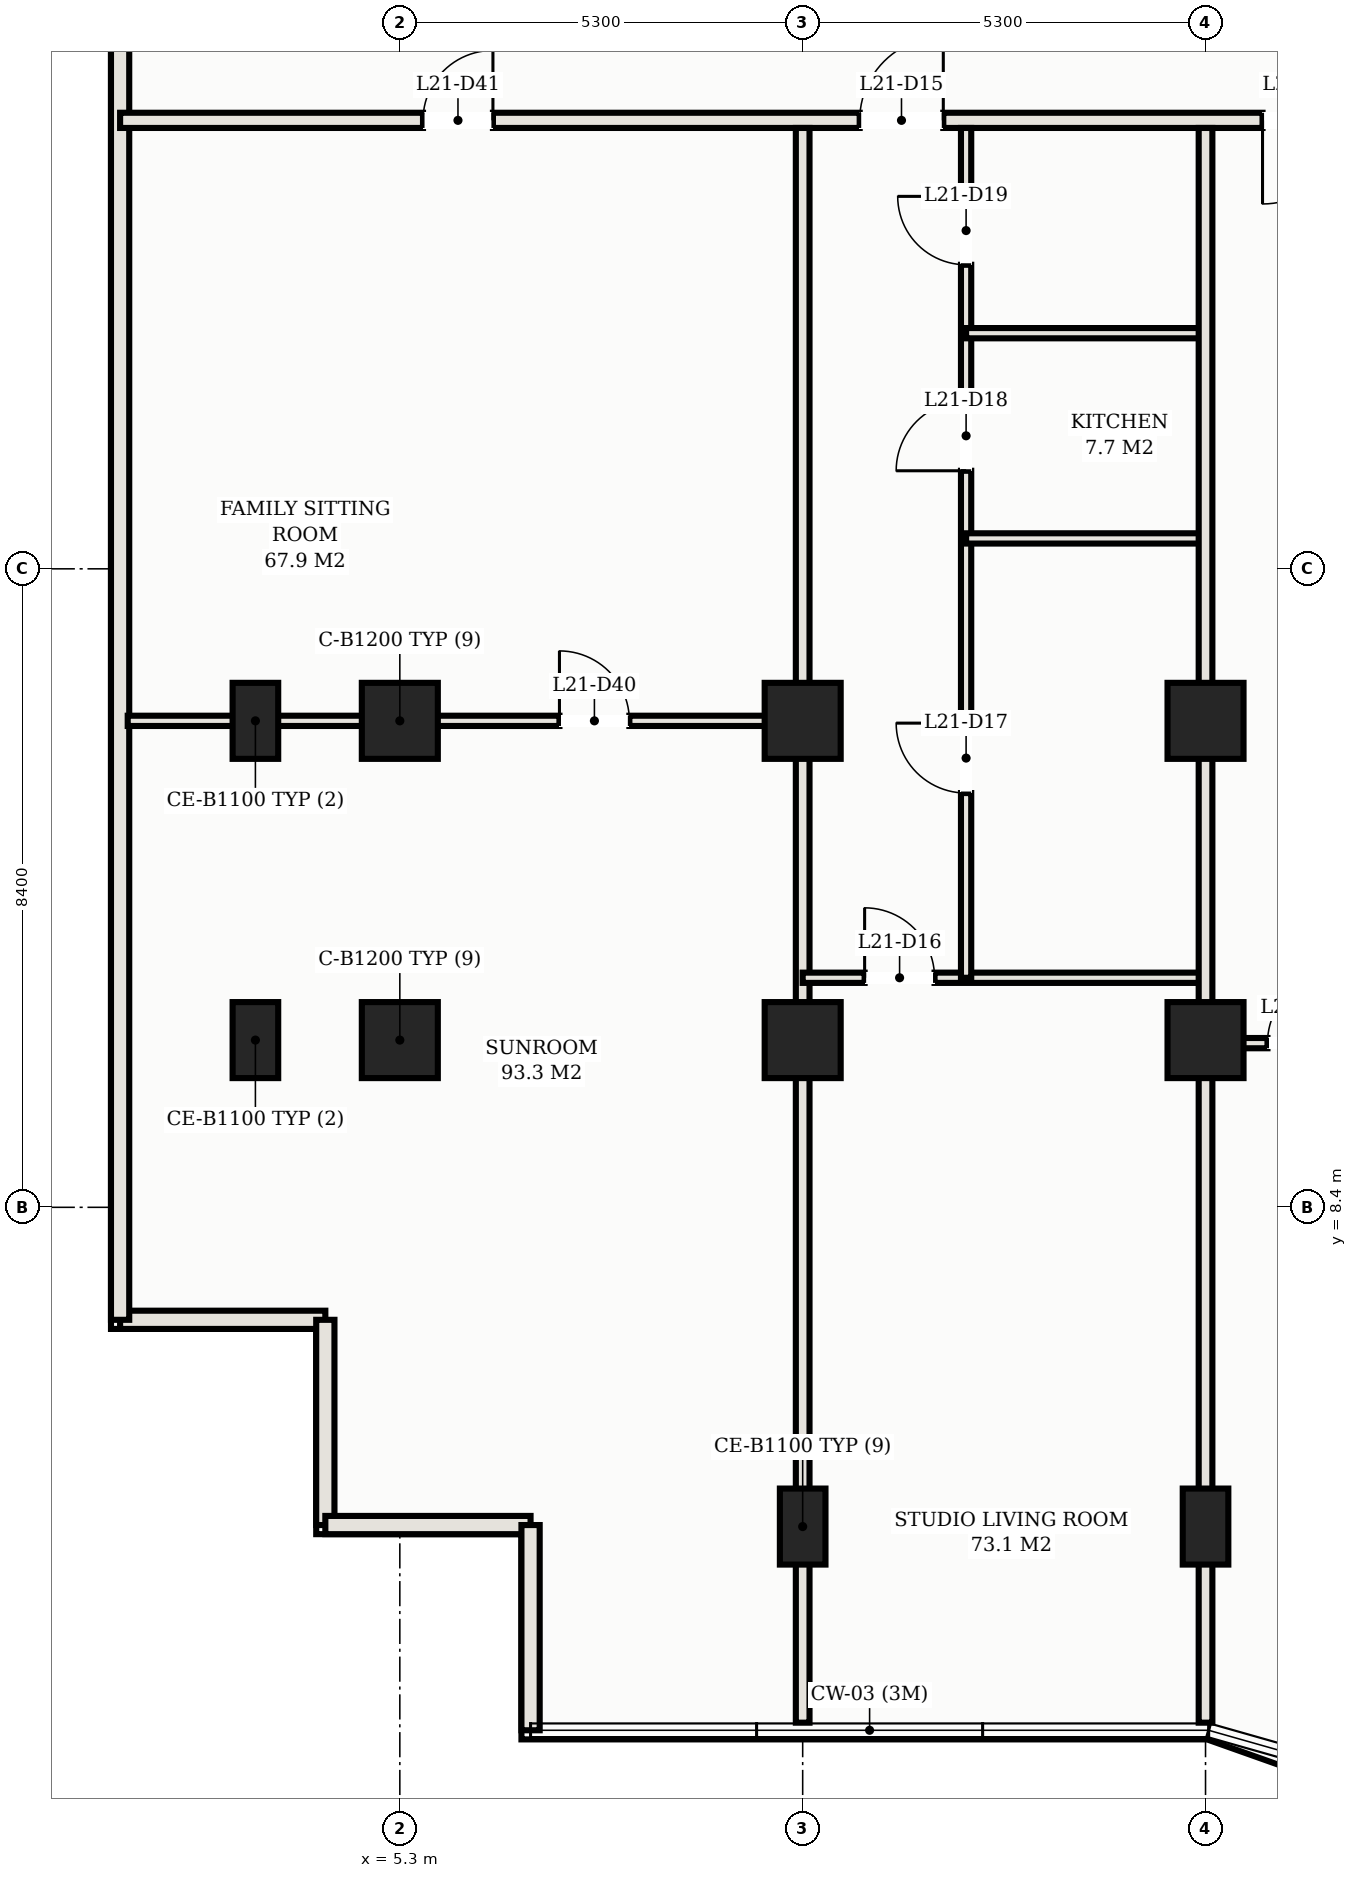
"""IFC4 building model, lengths in metres.
Left out: names, types, materials, properties, quantities, classifications, styles, units other than length and angle.
Written with IfcOpenShell. Run it as: python <this file> out.ifc"""

import sys

from ifc_helpers import new_model, si_unit, direction, frame, frame_2d, origin, origin_2d, place, context, subcontext, project, spatial, rectangle, hollow_rectangle, extrude, element, fill, save


model = new_model("IFC4")
c1 = context("Model", 3, precision=1e-05, world=origin(), true_north=direction((0.0, 1.0)))
c2 = subcontext(c1, "Body", "Model", "MODEL_VIEW")
j1 = project(units=[si_unit("LENGTHUNIT", "METRE"), si_unit("PLANEANGLEUNIT", "RADIAN")], contexts=[c1])
p1 = place(None, origin())
s1 = spatial("IfcSite", under=j1, at=p1, CompositionType="ELEMENT")
p2 = place(p1, origin())
s2 = spatial("IfcBuilding", under=s1, at=p2, CompositionType="ELEMENT")
p3 = place(p2, frame((0.0, 0.0, 81.7)))
s3 = spatial("IfcBuildingStorey", under=s2, at=p3, CompositionType="ELEMENT", Elevation=81.7)
for number, where, z_axis, x_axis in (
    (1, (10.6, 14.8, 0.0), (0.0, 0.0, 1.0), (1.0, 0.0, 0.0)),
    (2, (10.6, 10.6, 0.0), (0.0, 0.0, 1.0), (1.0, 0.0, 0.0)),
    (3, (15.9, 14.8, 0.0), (0.0, 0.0, 1.0), (1.0, 0.0, 0.0)),
    (4, (15.9, 10.6, 0.0), (0.0, 0.0, 1.0), (1.0, 0.0, 0.0)),
):
    element("IfcColumn", number, at=place(p3, frame(where, z_axis=z_axis, x_axis=x_axis)), inside=s3, PredefinedType="COLUMN", context=c2, shape_type="SweptSolid", body=[
        extrude(hollow_rectangle(XDim=1.0, YDim=1.0, WallThickness=0.036, at=origin_2d()), origin(), (0.0, 0.0, 1.0), 3.3),
    ])
for number, where, z_axis, x_axis in (
    (5, (10.6, 4.2, 0.0), (0.0, 0.0, 1.0), (1.0, 0.0, 0.0)),
    (6, (15.9, 4.2, 0.0), (0.0, 0.0, 1.0), (1.0, 0.0, 0.0)),
    (7, (3.4, 10.6, 0.0), (0.0, 0.0, 1.0), (1.0, 0.0, 0.0)),
    (8, (3.4, 14.8, 0.0), (0.0, 0.0, 1.0), (1.0, 0.0, 0.0)),
):
    element("IfcColumn", number, at=place(p3, frame(where, z_axis=z_axis, x_axis=x_axis)), inside=s3, PredefinedType="COLUMN", context=c2, shape_type="SweptSolid", body=[
        extrude(hollow_rectangle(XDim=0.6, YDim=1.0, WallThickness=0.032, at=origin_2d()), origin(), (0.0, 0.0, 1.0), 3.3),
    ])
for number, where, z_axis, x_axis in (
    (9, (5.3, 10.6, 0.0), (0.0, 0.0, 1.0), (1.0, 0.0, 0.0)),
    (10, (5.3, 14.8, 0.0), (0.0, 0.0, 1.0), (1.0, 0.0, 0.0)),
):
    element("IfcColumn", number, at=place(p3, frame(where, z_axis=z_axis, x_axis=x_axis)), inside=s3, PredefinedType="COLUMN", context=c2, shape_type="SweptSolid", body=[
        extrude(hollow_rectangle(XDim=1.0, YDim=1.0, WallThickness=0.036, at=origin_2d()), origin(), (0.0, 0.0, 1.0), 3.3),
    ])
for number, where, z_axis, x_axis in (
    (11, (1.62, 6.92, 0.0), (0.0, 0.0, 1.0), (1.0, 0.0, 0.0)),
    (12, (4.32, 6.92, 0.0), (0.0, 0.0, 1.0), (0.0, -1.0, 0.0)),
    (13, (4.32, 4.22, 0.0), (0.0, 0.0, 1.0), (1.0, 0.0, 0.0)),
    (14, (7.02, 4.22, 0.0), (0.0, 0.0, 1.0), (0.0, -1.0, 0.0)),
):
    element("IfcWall", number, at=place(p3, frame(where, z_axis=z_axis, x_axis=x_axis)), inside=s3, PredefinedType="SOLIDWALL", context=c2, shape_type="SweptSolid", body=[
        extrude(rectangle(XDim=2.7, YDim=0.24, at=frame_2d((1.35, 0.0))), origin(), (0.0, 0.0, 1.0), 3.09),
    ])
p4 = place(p3, frame((1.62, 35.33, 0.0), z_axis=(0.0, 0.0, 1.0), x_axis=(0.0, -1.0, 0.0)))
e15 = element("IfcWall", 15, at=p4, inside=s3, PredefinedType="SOLIDWALL", context=c2, shape_type="SweptSolid", body=[
    extrude(rectangle(XDim=28.41, YDim=0.24, at=frame_2d((14.205, 0.0))), origin(), (0.0, 0.0, 1.0), 3.09),
])
p5 = place(p3, frame((1.62, 22.7, 0.0), z_axis=(0.0, 0.0, 1.0), x_axis=(1.0, 0.0, 0.0)))
e16 = element("IfcWall", 16, at=p5, inside=s3, PredefinedType="PARTITIONING", context=c2, shape_type="SweptSolid", body=[
    extrude(rectangle(XDim=49.76, YDim=0.2, at=frame_2d((24.88, 0.0))), origin(), (0.0, 0.0, 1.0), 2.38),
])
p6 = place(p5, frame((9.73, 0.0, 0.0)))
e17 = element("IfcOpeningElement", 17, at=p6, cuts=e16, PredefinedType="OPENING", context=c2, shape_type="SweptSolid", body=[
    extrude(rectangle(XDim=1.1, YDim=2.25, at=frame_2d((0.55, 1.125))), frame((0.0, 0.11, 0.0), z_axis=(0.0, -1.0, 0.0), x_axis=(1.0, 0.0, 0.0)), (0.0, 0.0, 1.0), 0.22),
])
p7 = place(p5, frame((15.03, 0.0, 0.0)))
e18 = element("IfcOpeningElement", 18, at=p7, cuts=e16, PredefinedType="OPENING", context=c2, shape_type="SweptSolid", body=[
    extrude(rectangle(XDim=1.1, YDim=2.25, at=frame_2d((0.55, 1.125))), frame((0.0, 0.11, 0.0), z_axis=(0.0, -1.0, 0.0), x_axis=(1.0, 0.0, 0.0)), (0.0, 0.0, 1.0), 0.22),
])
p8 = place(p5, frame((20.33, 0.0, 0.0)))
e19 = element("IfcOpeningElement", 19, at=p8, cuts=e16, PredefinedType="OPENING", context=c2, shape_type="SweptSolid", body=[
    extrude(rectangle(XDim=1.1, YDim=2.25, at=frame_2d((0.55, 1.125))), frame((0.0, 0.11, 0.0), z_axis=(0.0, -1.0, 0.0), x_axis=(1.0, 0.0, 0.0)), (0.0, 0.0, 1.0), 0.22),
])
p9 = place(p5, frame((25.63, 0.0, 0.0)))
e20 = element("IfcOpeningElement", 20, at=p9, cuts=e16, PredefinedType="OPENING", context=c2, shape_type="SweptSolid", body=[
    extrude(rectangle(XDim=1.1, YDim=2.25, at=frame_2d((0.55, 1.125))), frame((0.0, 0.11, 0.0), z_axis=(0.0, -1.0, 0.0), x_axis=(1.0, 0.0, 0.0)), (0.0, 0.0, 1.0), 0.22),
])
p10 = place(p5, frame((33.33, 0.0, 0.0)))
e21 = element("IfcOpeningElement", 21, at=p10, cuts=e16, PredefinedType="OPENING", context=c2, shape_type="SweptSolid", body=[
    extrude(rectangle(XDim=1.1, YDim=2.25, at=frame_2d((0.55, 1.125))), frame((0.0, 0.11, 0.0), z_axis=(0.0, -1.0, 0.0), x_axis=(1.0, 0.0, 0.0)), (0.0, 0.0, 1.0), 0.22),
])
p11 = place(p5, frame((3.985, 0.0, 0.0)))
e22 = element("IfcOpeningElement", 22, at=p11, cuts=e16, PredefinedType="OPENING", context=c2, shape_type="SweptSolid", body=[
    extrude(rectangle(XDim=0.92, YDim=2.15, at=frame_2d((0.46, 1.075))), frame((0.0, 0.11, 0.0), z_axis=(0.0, -1.0, 0.0), x_axis=(1.0, 0.0, 0.0)), (0.0, 0.0, 1.0), 0.22),
])
p12 = place(p5, frame((44.855, 0.0, 0.0)))
e23 = element("IfcOpeningElement", 23, at=p12, cuts=e16, PredefinedType="OPENING", context=c2, shape_type="SweptSolid", body=[
    extrude(rectangle(XDim=0.92, YDim=2.15, at=frame_2d((0.46, 1.075))), frame((0.0, 0.11, 0.0), z_axis=(0.0, -1.0, 0.0), x_axis=(1.0, 0.0, 0.0)), (0.0, 0.0, 1.0), 0.22),
])
p13 = place(p3, frame((10.6, 1.62, 0.0), z_axis=(0.0, 0.0, 1.0), x_axis=(0.0, 1.0, 0.0)))
e24 = element("IfcWall", 24, at=p13, inside=s3, PredefinedType="PARTITIONING", context=c2, shape_type="SweptSolid", body=[
    extrude(rectangle(XDim=20.98, YDim=0.18, at=frame_2d((10.49, 0.0))), origin(), (0.0, 0.0, 1.0), 2.335),
])
p14 = place(p3, frame((10.6, 11.42, 0.0), z_axis=(0.0, 0.0, 1.0), x_axis=(1.0, 0.0, 0.0)))
e25 = element("IfcWall", 25, at=p14, inside=s3, PredefinedType="PARTITIONING", context=c2, shape_type="SweptSolid", body=[
    extrude(rectangle(XDim=5.3, YDim=0.135, at=frame_2d((2.65, 0.0))), origin(), (0.0, 0.0, 1.0), 2.38),
])
p15 = place(p14, frame((0.815, 0.0, 0.0)))
e26 = element("IfcOpeningElement", 26, at=p15, cuts=e25, PredefinedType="OPENING", context=c2, shape_type="SweptSolid", body=[
    extrude(rectangle(XDim=0.92, YDim=2.15, at=frame_2d((0.46, 1.075))), frame((0.0, 0.078, 0.0), z_axis=(0.0, -1.0, 0.0), x_axis=(1.0, 0.0, 0.0)), (0.0, 0.0, 1.0), 0.155),
])
p16 = place(p3, frame((12.75, 11.42, 0.0), z_axis=(0.0, 0.0, 1.0), x_axis=(0.0, 1.0, 0.0)))
e27 = element("IfcWall", 27, at=p16, inside=s3, PredefinedType="PARTITIONING", context=c2, shape_type="SweptSolid", body=[
    extrude(rectangle(XDim=11.18, YDim=0.135, at=frame_2d((5.59, 0.0))), origin(), (0.0, 0.0, 1.0), 2.38),
])
p17 = place(p16, frame((2.43, 0.0, 0.0)))
e28 = element("IfcOpeningElement", 28, at=p17, cuts=e27, PredefinedType="OPENING", context=c2, shape_type="SweptSolid", body=[
    extrude(rectangle(XDim=0.92, YDim=2.15, at=frame_2d((0.46, 1.075))), frame((0.0, 0.078, 0.0), z_axis=(0.0, -1.0, 0.0), x_axis=(1.0, 0.0, 0.0)), (0.0, 0.0, 1.0), 0.155),
])
p18 = place(p16, frame((6.67, 0.0, 0.0)))
e29 = element("IfcOpeningElement", 29, at=p18, cuts=e27, PredefinedType="OPENING", context=c2, shape_type="SweptSolid", body=[
    extrude(rectangle(XDim=0.92, YDim=2.15, at=frame_2d((0.46, 1.075))), frame((0.0, 0.078, 0.0), z_axis=(0.0, -1.0, 0.0), x_axis=(1.0, 0.0, 0.0)), (0.0, 0.0, 1.0), 0.155),
])
p19 = place(p16, frame((9.38, 0.0, 0.0)))
e30 = element("IfcOpeningElement", 30, at=p19, cuts=e27, PredefinedType="OPENING", context=c2, shape_type="SweptSolid", body=[
    extrude(rectangle(XDim=0.9, YDim=2.15, at=frame_2d((0.45, 1.075))), frame((0.0, 0.078, 0.0), z_axis=(0.0, -1.0, 0.0), x_axis=(1.0, 0.0, 0.0)), (0.0, 0.0, 1.0), 0.155),
])
for number, where, z_axis, x_axis in (
    (31, (12.75, 17.2, 0.0), (0.0, 0.0, 1.0), (1.0, 0.0, 0.0)),
    (32, (12.75, 19.9, 0.0), (0.0, 0.0, 1.0), (1.0, 0.0, 0.0)),
):
    element("IfcWall", number, at=place(p3, frame(where, z_axis=z_axis, x_axis=x_axis)), inside=s3, PredefinedType="PARTITIONING", context=c2, shape_type="SweptSolid", body=[
        extrude(rectangle(XDim=3.15, YDim=0.135, at=frame_2d((1.575, 0.0))), origin(), (0.0, 0.0, 1.0), 2.38),
    ])
p20 = place(p3, frame((15.9, 1.62, 0.0), z_axis=(0.0, 0.0, 1.0), x_axis=(0.0, 1.0, 0.0)))
e33 = element("IfcWall", 33, at=p20, inside=s3, PredefinedType="PARTITIONING", context=c2, shape_type="SweptSolid", body=[
    extrude(rectangle(XDim=20.98, YDim=0.18, at=frame_2d((10.49, 0.0))), origin(), (0.0, 0.0, 1.0), 2.335),
])
p21 = place(p3, frame((15.9, 10.56, 0.0), z_axis=(0.0, 0.0, 1.0), x_axis=(1.0, 0.0, 0.0)))
e34 = element("IfcWall", 34, at=p21, inside=s3, PredefinedType="PARTITIONING", context=c2, shape_type="SweptSolid", body=[
    extrude(rectangle(XDim=5.3, YDim=0.135, at=frame_2d((2.65, 0.0))), origin(), (0.0, 0.0, 1.0), 2.335),
])
p22 = place(p21, frame((0.815, 0.0, 0.0)))
e35 = element("IfcOpeningElement", 35, at=p22, cuts=e34, PredefinedType="OPENING", context=c2, shape_type="SweptSolid", body=[
    extrude(rectangle(XDim=0.92, YDim=2.15, at=frame_2d((0.46, 1.075))), frame((0.0, 0.078, 0.0), z_axis=(0.0, -1.0, 0.0), x_axis=(1.0, 0.0, 0.0)), (0.0, 0.0, 1.0), 0.155),
])
p23 = place(p3, frame((1.72, 14.8, 0.0), z_axis=(0.0, 0.0, 1.0), x_axis=(1.0, 0.0, 0.0)))
e36 = element("IfcWall", 36, at=p23, inside=s3, PredefinedType="PARTITIONING", context=c2, shape_type="SweptSolid", body=[
    extrude(rectangle(XDim=8.88, YDim=0.135, at=frame_2d((4.44, 0.0))), origin(), (0.0, 0.0, 1.0), 2.335),
])
p24 = place(p23, frame((5.68, 0.0, 0.0)))
e37 = element("IfcOpeningElement", 37, at=p24, cuts=e36, PredefinedType="OPENING", context=c2, shape_type="SweptSolid", body=[
    extrude(rectangle(XDim=0.92, YDim=2.15, at=frame_2d((0.46, 1.075))), frame((0.0, 0.078, 0.0), z_axis=(0.0, -1.0, 0.0), x_axis=(1.0, 0.0, 0.0)), (0.0, 0.0, 1.0), 0.155),
])
p25 = place(p6, origin())
e38 = element("IfcDoor", 38, at=p25, inside=s3, OperationType="SINGLE_SWING_RIGHT", PredefinedType="DOOR", context=c2, shape_type="SweptSolid", body=[
    extrude(rectangle(XDim=1.1, YDim=2.25, at=frame_2d((0.55, 1.125))), frame((0.0, 0.025, 0.0), z_axis=(0.0, -1.0, 0.0), x_axis=(1.0, 0.0, 0.0)), (0.0, 0.0, 1.0), 0.05),
])
fill(e17, e38)
p26 = place(p15, origin())
e39 = element("IfcDoor", 39, at=p26, inside=s3, OperationType="SINGLE_SWING_LEFT", PredefinedType="DOOR", context=c2, shape_type="SweptSolid", body=[
    extrude(rectangle(XDim=0.92, YDim=2.15, at=frame_2d((0.46, 1.075))), frame((0.0, 0.025, 0.0), z_axis=(0.0, -1.0, 0.0), x_axis=(1.0, 0.0, 0.0)), (0.0, 0.0, 1.0), 0.05),
])
fill(e26, e39)
p27 = place(p17, origin())
e40 = element("IfcDoor", 40, at=p27, inside=s3, OperationType="SINGLE_SWING_RIGHT", PredefinedType="DOOR", context=c2, shape_type="SweptSolid", body=[
    extrude(rectangle(XDim=0.92, YDim=2.15, at=frame_2d((0.46, 1.075))), frame((0.0, 0.025, 0.0), z_axis=(0.0, -1.0, 0.0), x_axis=(1.0, 0.0, 0.0)), (0.0, 0.0, 1.0), 0.05),
])
fill(e28, e40)
p28 = place(p18, origin())
e41 = element("IfcDoor", 41, at=p28, inside=s3, OperationType="SINGLE_SWING_LEFT", PredefinedType="DOOR", context=c2, shape_type="SweptSolid", body=[
    extrude(rectangle(XDim=0.92, YDim=2.15, at=frame_2d((0.46, 1.075))), frame((0.0, 0.025, 0.0), z_axis=(0.0, -1.0, 0.0), x_axis=(1.0, 0.0, 0.0)), (0.0, 0.0, 1.0), 0.05),
])
fill(e29, e41)
p29 = place(p19, origin())
e42 = element("IfcDoor", 42, at=p29, inside=s3, OperationType="SINGLE_SWING_RIGHT", PredefinedType="DOOR", context=c2, shape_type="SweptSolid", body=[
    extrude(rectangle(XDim=0.9, YDim=2.15, at=frame_2d((0.45, 1.075))), frame((0.0, 0.025, 0.0), z_axis=(0.0, -1.0, 0.0), x_axis=(1.0, 0.0, 0.0)), (0.0, 0.0, 1.0), 0.05),
])
fill(e30, e42)
p30 = place(p7, frame((1.1, 0.0, 0.0), z_axis=(0.0, 0.0, 1.0), x_axis=(-1.0, 0.0, 0.0)))
e43 = element("IfcDoor", 43, at=p30, inside=s3, OperationType="SINGLE_SWING_RIGHT", PredefinedType="DOOR", context=c2, shape_type="SweptSolid", body=[
    extrude(rectangle(XDim=1.1, YDim=2.25, at=frame_2d((0.55, 1.125))), frame((0.0, 0.025, 0.0), z_axis=(0.0, -1.0, 0.0), x_axis=(1.0, 0.0, 0.0)), (0.0, 0.0, 1.0), 0.05),
])
fill(e18, e43)
p31 = place(p22, origin())
e44 = element("IfcDoor", 44, at=p31, inside=s3, OperationType="SINGLE_SWING_RIGHT", PredefinedType="DOOR", context=c2, shape_type="SweptSolid", body=[
    extrude(rectangle(XDim=0.92, YDim=2.15, at=frame_2d((0.46, 1.075))), frame((0.0, 0.025, 0.0), z_axis=(0.0, -1.0, 0.0), x_axis=(1.0, 0.0, 0.0)), (0.0, 0.0, 1.0), 0.05),
])
fill(e35, e44)
p32 = place(p24, origin())
e45 = element("IfcDoor", 45, at=p32, inside=s3, OperationType="SINGLE_SWING_LEFT", PredefinedType="DOOR", context=c2, shape_type="SweptSolid", body=[
    extrude(rectangle(XDim=0.92, YDim=2.15, at=frame_2d((0.46, 1.075))), frame((0.0, 0.025, 0.0), z_axis=(0.0, -1.0, 0.0), x_axis=(1.0, 0.0, 0.0)), (0.0, 0.0, 1.0), 0.05),
])
fill(e37, e45)
p33 = place(p11, origin())
e46 = element("IfcDoor", 46, at=p33, inside=s3, OperationType="SINGLE_SWING_RIGHT", PredefinedType="DOOR", context=c2, shape_type="SweptSolid", body=[
    extrude(rectangle(XDim=0.92, YDim=2.15, at=frame_2d((0.46, 1.075))), frame((0.0, 0.025, 0.0), z_axis=(0.0, -1.0, 0.0), x_axis=(1.0, 0.0, 0.0)), (0.0, 0.0, 1.0), 0.05),
])
fill(e22, e46)
save(model, sys.argv[1])
